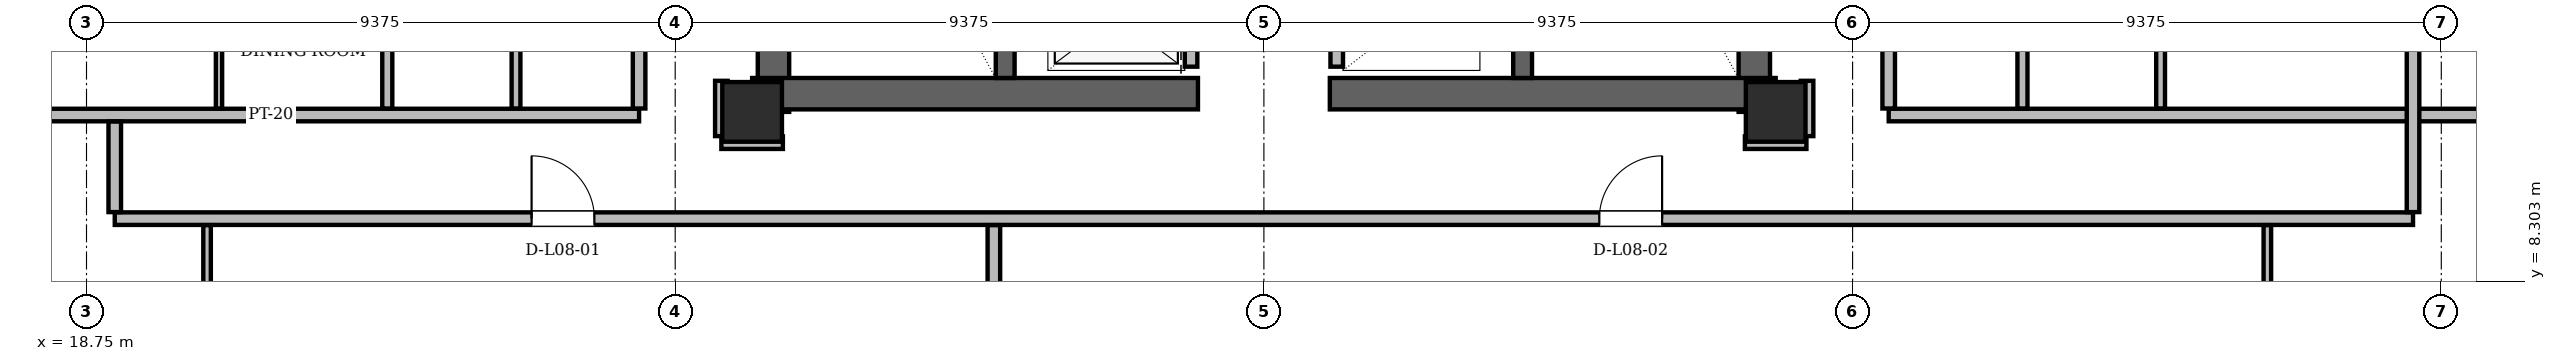
"""IFC4 building model, lengths in metres.
Left out: names, types, materials, properties, quantities, classifications, styles, units other than length and angle.
Written with IfcOpenShell. Run it as: python <this file> out.ifc"""

import sys

from ifc_helpers import new_model, si_unit, direction, frame, frame_2d, origin, origin_2d, place, context, subcontext, project, spatial, rectangle, hollow_rectangle, extrude, element, fill, save


model = new_model("IFC4")
c1 = context("Model", 3, precision=1e-05, world=origin(), true_north=direction((0.0, 1.0)))
c2 = subcontext(c1, "Body", "Model", "MODEL_VIEW")
j1 = project(units=[si_unit("LENGTHUNIT", "METRE"), si_unit("PLANEANGLEUNIT", "RADIAN")], contexts=[c1])
p1 = place(None, origin())
s1 = spatial("IfcSite", under=j1, at=p1, CompositionType="ELEMENT")
p2 = place(p1, origin())
s2 = spatial("IfcBuilding", under=s1, at=p2, CompositionType="ELEMENT")
p3 = place(p2, frame((0.0, 0.0, 34.5)))
s3 = spatial("IfcBuildingStorey", under=s2, at=p3, CompositionType="ELEMENT", Elevation=34.5)
for number, where, z_axis, x_axis in (
    (1, (29.35, 11.0, 0.0), (0.0, 0.0, 1.0), (1.0, 0.0, 0.0)),
    (2, (45.65, 11.0, 0.0), (0.0, 0.0, 1.0), (1.0, 0.0, 0.0)),
):
    element("IfcColumn", number, at=place(p3, frame(where, z_axis=z_axis, x_axis=x_axis)), inside=s3, PredefinedType="COLUMN", context=c2, shape_type="SweptSolid", body=[
        extrude(hollow_rectangle(XDim=0.95, YDim=0.95, WallThickness=0.08, at=origin_2d()), origin(), (0.0, 0.0, 1.0), 3.6),
    ])
for number, where, z_axis, x_axis in (
    (3, (29.69, 11.0, 0.0), (0.0, 0.0, 1.0), (0.0, 1.0, 0.0)),
    (4, (45.31, 11.0, 0.0), (0.0, 0.0, 1.0), (0.0, 1.0, 0.0)),
):
    element("IfcWall", number, at=place(p3, frame(where, z_axis=z_axis, x_axis=x_axis)), inside=s3, PredefinedType="SHEAR", context=c2, shape_type="SweptSolid", body=[
        extrude(rectangle(XDim=13.3, YDim=0.5, at=frame_2d((6.65, 0.0))), origin(), (0.0, 0.0, 1.0), 3.36),
    ])
for number, where, z_axis, x_axis in (
    (5, (29.35, 11.29, 0.0), (0.0, 0.0, 1.0), (1.0, 0.0, 0.0)),
    (6, (38.55, 11.29, 0.0), (0.0, 0.0, 1.0), (1.0, 0.0, 0.0)),
):
    element("IfcWall", number, at=place(p3, frame(where, z_axis=z_axis, x_axis=x_axis)), inside=s3, PredefinedType="SHEAR", context=c2, shape_type="SweptSolid", body=[
        extrude(rectangle(XDim=7.1, YDim=0.5, at=frame_2d((3.55, 0.0))), origin(), (0.0, 0.0, 1.0), 3.36),
    ])
for number, where, z_axis, x_axis in (
    (7, (33.38, 11.54, 0.0), (0.0, 0.0, 1.0), (0.0, 1.0, 0.0)),
    (8, (41.62, 11.54, 0.0), (0.0, 0.0, 1.0), (0.0, 1.0, 0.0)),
):
    element("IfcWall", number, at=place(p3, frame(where, z_axis=z_axis, x_axis=x_axis)), inside=s3, PredefinedType="SHEAR", context=c2, shape_type="SweptSolid", body=[
        extrude(rectangle(XDim=7.62, YDim=0.3, at=frame_2d((3.81, 0.0))), origin(), (0.0, 0.0, 1.0), 3.36),
    ])
p4 = place(p3, frame((13.222, 15.108, 0.0), z_axis=(0.0, 0.0, 1.0), x_axis=(0.499997339613, -0.866026939754, 0.0)))
e9 = element("IfcWall", 9, at=p4, inside=s3, PredefinedType="SOLIDWALL", context=c2, shape_type="SweptSolid", body=[
    extrude(rectangle(XDim=15.632, YDim=0.34, at=frame_2d((7.816, 0.0))), origin(), (0.0, 0.0, 1.0), 2.494),
])
p5 = place(p4, frame((1.411, 0.0, 1.28)))
e10 = element("IfcOpeningElement", 10, at=p5, cuts=e9, PredefinedType="OPENING", context=c2, shape_type="SweptSolid", body=[
    extrude(rectangle(XDim=0.85, YDim=0.92, at=frame_2d((0.425, 0.46))), frame((0.0, 0.17, 0.0), z_axis=(0.0, -1.0, 0.0), x_axis=(1.0, 0.0, 0.0)), (0.0, 0.0, 1.0), 0.34),
])
p6 = place(p3, frame((53.962, 1.57, 0.0), z_axis=(0.0, 0.0, 1.0), x_axis=(0.499997339613, 0.866026939754, 0.0)))
e11 = element("IfcWall", 11, at=p6, inside=s3, PredefinedType="SOLIDWALL", context=c2, shape_type="SweptSolid", body=[
    extrude(rectangle(XDim=15.632, YDim=0.34, at=frame_2d((7.816, 0.0))), origin(), (0.0, 0.0, 1.0), 2.494),
])
p7 = place(p6, frame((13.371, 0.0, 1.28)))
e12 = element("IfcOpeningElement", 12, at=p7, cuts=e11, PredefinedType="OPENING", context=c2, shape_type="SweptSolid", body=[
    extrude(rectangle(XDim=0.85, YDim=0.92, at=frame_2d((0.425, 0.46))), frame((0.0, 0.17, 0.0), z_axis=(0.0, -1.0, 0.0), x_axis=(1.0, 0.0, 0.0)), (0.0, 0.0, 1.0), 0.34),
])
p8 = place(p3, frame((36.34, 11.72, 0.0), z_axis=(0.0, 0.0, 1.0), x_axis=(0.0, 1.0, 0.0)))
e13 = element("IfcWall", 13, at=p8, inside=s3, PredefinedType="PARTITIONING", context=c2, shape_type="SweptSolid", body=[
    extrude(rectangle(XDim=7.6, YDim=0.2, at=frame_2d((3.8, 0.0))), origin(), (0.0, 0.0, 1.0), 3.36),
])
p9 = place(p8, frame((0.255, 0.0, 0.0)))
e14 = element("IfcOpeningElement", 14, at=p9, cuts=e13, PredefinedType="OPENING", context=c2, shape_type="SweptSolid", body=[
    extrude(rectangle(XDim=1.05, YDim=2.15, at=frame_2d((0.525, 1.075))), frame((0.0, 0.1, 0.0), z_axis=(0.0, -1.0, 0.0), x_axis=(1.0, 0.0, 0.0)), (0.0, 0.0, 1.0), 0.2),
])
p10 = place(p8, frame((2.105, 0.0, 0.0)))
e15 = element("IfcOpeningElement", 15, at=p10, cuts=e13, PredefinedType="OPENING", context=c2, shape_type="SweptSolid", body=[
    extrude(rectangle(XDim=1.05, YDim=2.15, at=frame_2d((0.525, 1.075))), frame((0.0, 0.1, 0.0), z_axis=(0.0, -1.0, 0.0), x_axis=(1.0, 0.0, 0.0)), (0.0, 0.0, 1.0), 0.2),
])
p11 = place(p8, frame((3.955, 0.0, 0.0)))
e16 = element("IfcOpeningElement", 16, at=p11, cuts=e13, PredefinedType="OPENING", context=c2, shape_type="SweptSolid", body=[
    extrude(rectangle(XDim=1.05, YDim=2.15, at=frame_2d((0.525, 1.075))), frame((0.0, 0.1, 0.0), z_axis=(0.0, -1.0, 0.0), x_axis=(1.0, 0.0, 0.0)), (0.0, 0.0, 1.0), 0.2),
])
p12 = place(p3, frame((38.66, 11.72, 0.0), z_axis=(0.0, 0.0, 1.0), x_axis=(0.0, 1.0, 0.0)))
e17 = element("IfcWall", 17, at=p12, inside=s3, PredefinedType="PARTITIONING", context=c2, shape_type="SweptSolid", body=[
    extrude(rectangle(XDim=9.1, YDim=0.2, at=frame_2d((4.55, 0.0))), origin(), (0.0, 0.0, 1.0), 3.36),
])
p13 = place(p3, frame((19.2, 9.3, 0.0), z_axis=(0.0, 0.0, 1.0), x_axis=(1.0, 0.0, 0.0)))
e18 = element("IfcWall", 18, at=p13, inside=s3, PredefinedType="PARTITIONING", context=c2, shape_type="SweptSolid", body=[
    extrude(rectangle(XDim=36.6, YDim=0.2, at=frame_2d((18.3, 0.0))), origin(), (0.0, 0.0, 1.0), 2.738),
])
p14 = place(p13, frame((6.638, 0.0, 0.0)))
e19 = element("IfcOpeningElement", 19, at=p14, cuts=e18, PredefinedType="OPENING", context=c2, shape_type="SweptSolid", body=[
    extrude(rectangle(XDim=1.0, YDim=2.18, at=frame_2d((0.5, 1.09))), frame((0.0, 0.1, 0.0), z_axis=(0.0, -1.0, 0.0), x_axis=(1.0, 0.0, 0.0)), (0.0, 0.0, 1.0), 0.2),
])
p15 = place(p13, frame((23.642, 0.0, 0.0)))
e20 = element("IfcOpeningElement", 20, at=p15, cuts=e18, PredefinedType="OPENING", context=c2, shape_type="SweptSolid", body=[
    extrude(rectangle(XDim=1.0, YDim=2.18, at=frame_2d((0.5, 1.09))), frame((0.0, 0.1, 0.0), z_axis=(0.0, -1.0, 0.0), x_axis=(1.0, 0.0, 0.0)), (0.0, 0.0, 1.0), 0.2),
])
for number, where, z_axis, x_axis in (
    (21, (28.86, 10.51, 0.0), (0.0, 0.0, 1.0), (1.0, 0.0, 0.0)),
    (22, (45.16, 10.51, 0.0), (0.0, 0.0, 1.0), (1.0, 0.0, 0.0)),
):
    element("IfcWall", number, at=place(p3, frame(where, z_axis=z_axis, x_axis=x_axis)), inside=s3, PredefinedType="PARTITIONING", context=c2, shape_type="SweptSolid", body=[
        extrude(rectangle(XDim=0.98, YDim=0.2, at=frame_2d((0.49, 0.0))), origin(), (0.0, 0.0, 1.0), 2.738),
    ])
for number, where, z_axis, x_axis in (
    (23, (15.824, 10.95, 0.0), (0.0, 0.0, 1.0), (1.0, 0.0, 0.0)),
    (24, (47.45, 10.95, 0.0), (0.0, 0.0, 1.0), (1.0, 0.0, 0.0)),
):
    element("IfcWall", number, at=place(p3, frame(where, z_axis=z_axis, x_axis=x_axis)), inside=s3, PredefinedType="PARTITIONING", context=c2, shape_type="SweptSolid", body=[
        extrude(rectangle(XDim=11.726, YDim=0.2, at=frame_2d((5.863, 0.0))), origin(), (0.0, 0.0, 1.0), 3.36),
    ])
p16 = place(p3, frame((19.2, 9.404, 0.0), z_axis=(0.0, 0.0, 1.0), x_axis=(0.0, 1.0, 0.0)))
e25 = element("IfcWall", 25, at=p16, inside=s3, PredefinedType="PARTITIONING", context=c2, shape_type="SweptSolid", body=[
    extrude(rectangle(XDim=1.442, YDim=0.2, at=frame_2d((0.721, 0.0))), origin(), (0.0, 0.0, 1.0), 3.36),
])
p17 = place(p3, frame((20.67, 2.556, 0.0), z_axis=(0.0, 0.0, 1.0), x_axis=(0.0, 1.0, 0.0)))
e26 = element("IfcWall", 26, at=p17, inside=s3, PredefinedType="PARTITIONING", context=c2, shape_type="SweptSolid", body=[
    extrude(rectangle(XDim=6.64, YDim=0.12, at=frame_2d((3.32, 0.0))), origin(), (0.0, 0.0, 1.0), 3.36),
])
p18 = place(p17, frame((2.906, 0.0, 0.0)))
e27 = element("IfcOpeningElement", 27, at=p18, cuts=e26, PredefinedType="OPENING", context=c2, shape_type="SweptSolid", body=[
    extrude(rectangle(XDim=0.88, YDim=2.08, at=frame_2d((0.44, 1.04))), frame((0.0, 0.06, 0.0), z_axis=(0.0, -1.0, 0.0), x_axis=(1.0, 0.0, 0.0)), (0.0, 0.0, 1.0), 0.12),
])
p19 = place(p3, frame((20.86, 11.054, 0.0), z_axis=(0.0, 0.0, 1.0), x_axis=(0.0, 1.0, 0.0)))
e28 = element("IfcWall", 28, at=p19, inside=s3, PredefinedType="PARTITIONING", context=c2, shape_type="SweptSolid", body=[
    extrude(rectangle(XDim=3.572, YDim=0.1, at=frame_2d((1.786, 0.0))), origin(), (0.0, 0.0, 1.0), 2.738),
])
p20 = place(p3, frame((23.54, 11.054, 0.0), z_axis=(0.0, 0.0, 1.0), x_axis=(0.0, 1.0, 0.0)))
e29 = element("IfcWall", 29, at=p20, inside=s3, PredefinedType="PARTITIONING", context=c2, shape_type="SweptSolid", body=[
    extrude(rectangle(XDim=3.572, YDim=0.16, at=frame_2d((1.786, 0.0))), origin(), (0.0, 0.0, 1.0), 2.738),
])
p21 = place(p3, frame((25.59, 11.054, 0.0), z_axis=(0.0, 0.0, 1.0), x_axis=(0.0, 1.0, 0.0)))
e30 = element("IfcWall", 30, at=p21, inside=s3, PredefinedType="PARTITIONING", context=c2, shape_type="SweptSolid", body=[
    extrude(rectangle(XDim=3.572, YDim=0.14, at=frame_2d((1.786, 0.0))), origin(), (0.0, 0.0, 1.0), 2.738),
])
p22 = place(p3, frame((27.55, 11.054, 0.0), z_axis=(0.0, 0.0, 1.0), x_axis=(0.0, 1.0, 0.0)))
e31 = element("IfcWall", 31, at=p22, inside=s3, PredefinedType="PARTITIONING", context=c2, shape_type="SweptSolid", body=[
    extrude(rectangle(XDim=14.812, YDim=0.2, at=frame_2d((7.406, 0.0))), origin(), (0.0, 0.0, 1.0), 2.738),
])
p23 = place(p22, frame((7.932, 0.0, 0.0)))
e32 = element("IfcOpeningElement", 32, at=p23, cuts=e31, PredefinedType="OPENING", context=c2, shape_type="SweptSolid", body=[
    extrude(rectangle(XDim=1.0, YDim=2.18, at=frame_2d((0.5, 1.09))), frame((0.0, 0.1, 0.0), z_axis=(0.0, -1.0, 0.0), x_axis=(1.0, 0.0, 0.0)), (0.0, 0.0, 1.0), 0.2),
])
p24 = place(p3, frame((28.86, 10.614, 0.0), z_axis=(0.0, 0.0, 1.0), x_axis=(0.0, 1.0, 0.0)))
e33 = element("IfcWall", 33, at=p24, inside=s3, PredefinedType="PARTITIONING", context=c2, shape_type="SweptSolid", body=[
    extrude(rectangle(XDim=0.881, YDim=0.2, at=frame_2d((0.44, 0.0))), origin(), (0.0, 0.0, 1.0), 2.738),
])
p25 = place(p3, frame((33.2, 1.744, 0.0), z_axis=(0.0, 0.0, 1.0), x_axis=(0.0, 1.0, 0.0)))
e34 = element("IfcWall", 34, at=p25, inside=s3, PredefinedType="PARTITIONING", context=c2, shape_type="SweptSolid", body=[
    extrude(rectangle(XDim=7.452, YDim=0.2, at=frame_2d((3.726, 0.0))), origin(), (0.0, 0.0, 1.0), 2.946),
])
p26 = place(p3, frame((46.15, 10.614, 0.0), z_axis=(0.0, 0.0, 1.0), x_axis=(0.0, 1.0, 0.0)))
e35 = element("IfcWall", 35, at=p26, inside=s3, PredefinedType="PARTITIONING", context=c2, shape_type="SweptSolid", body=[
    extrude(rectangle(XDim=0.881, YDim=0.2, at=frame_2d((0.44, 0.0))), origin(), (0.0, 0.0, 1.0), 2.738),
])
p27 = place(p3, frame((47.45, 11.054, 0.0), z_axis=(0.0, 0.0, 1.0), x_axis=(0.0, 1.0, 0.0)))
e36 = element("IfcWall", 36, at=p27, inside=s3, PredefinedType="PARTITIONING", context=c2, shape_type="SweptSolid", body=[
    extrude(rectangle(XDim=14.812, YDim=0.2, at=frame_2d((7.406, 0.0))), origin(), (0.0, 0.0, 1.0), 2.738),
])
p28 = place(p27, frame((7.932, 0.0, 0.0)))
e37 = element("IfcOpeningElement", 37, at=p28, cuts=e36, PredefinedType="OPENING", context=c2, shape_type="SweptSolid", body=[
    extrude(rectangle(XDim=1.0, YDim=2.18, at=frame_2d((0.5, 1.09))), frame((0.0, 0.1, 0.0), z_axis=(0.0, -1.0, 0.0), x_axis=(1.0, 0.0, 0.0)), (0.0, 0.0, 1.0), 0.2),
])
p29 = place(p3, frame((49.58, 11.054, 0.0), z_axis=(0.0, 0.0, 1.0), x_axis=(0.0, 1.0, 0.0)))
e38 = element("IfcWall", 38, at=p29, inside=s3, PredefinedType="PARTITIONING", context=c2, shape_type="SweptSolid", body=[
    extrude(rectangle(XDim=3.582, YDim=0.16, at=frame_2d((1.791, 0.0))), origin(), (0.0, 0.0, 1.0), 2.738),
])
p30 = place(p3, frame((51.78, 11.054, 0.0), z_axis=(0.0, 0.0, 1.0), x_axis=(0.0, 1.0, 0.0)))
e39 = element("IfcWall", 39, at=p30, inside=s3, PredefinedType="PARTITIONING", context=c2, shape_type="SweptSolid", body=[
    extrude(rectangle(XDim=3.582, YDim=0.14, at=frame_2d((1.791, 0.0))), origin(), (0.0, 0.0, 1.0), 2.738),
])
p31 = place(p3, frame((53.48, 1.744, 0.0), z_axis=(0.0, 0.0, 1.0), x_axis=(0.0, 1.0, 0.0)))
e40 = element("IfcWall", 40, at=p31, inside=s3, PredefinedType="PARTITIONING", context=c2, shape_type="SweptSolid", body=[
    extrude(rectangle(XDim=7.452, YDim=0.12, at=frame_2d((3.726, 0.0))), origin(), (0.0, 0.0, 1.0), 2.738),
])
p32 = place(p31, frame((3.326, 0.0, 0.0)))
e41 = element("IfcOpeningElement", 41, at=p32, cuts=e40, PredefinedType="OPENING", context=c2, shape_type="SweptSolid", body=[
    extrude(rectangle(XDim=0.88, YDim=2.08, at=frame_2d((0.44, 1.04))), frame((0.0, 0.06, 0.0), z_axis=(0.0, -1.0, 0.0), x_axis=(1.0, 0.0, 0.0)), (0.0, 0.0, 1.0), 0.12),
])
p33 = place(p3, frame((55.8, 9.404, 0.0), z_axis=(0.0, 0.0, 1.0), x_axis=(0.0, 1.0, 0.0)))
e42 = element("IfcWall", 42, at=p33, inside=s3, PredefinedType="PARTITIONING", context=c2, shape_type="SweptSolid", body=[
    extrude(rectangle(XDim=5.232, YDim=0.2, at=frame_2d((2.616, 0.0))), origin(), (0.0, 0.0, 1.0), 2.738),
])
p34 = place(p14, origin())
e43 = element("IfcDoor", 43, at=p34, inside=s3, OperationType="SINGLE_SWING_LEFT", PredefinedType="DOOR", context=c2, shape_type="SweptSolid", body=[
    extrude(rectangle(XDim=1.0, YDim=2.18, at=frame_2d((0.5, 1.09))), frame((0.0, 0.025, 0.0), z_axis=(0.0, -1.0, 0.0), x_axis=(1.0, 0.0, 0.0)), (0.0, 0.0, 1.0), 0.05),
])
fill(e19, e43)
p35 = place(p15, origin())
e44 = element("IfcDoor", 44, at=p35, inside=s3, OperationType="SINGLE_SWING_RIGHT", PredefinedType="DOOR", context=c2, shape_type="SweptSolid", body=[
    extrude(rectangle(XDim=1.0, YDim=2.18, at=frame_2d((0.5, 1.09))), frame((0.0, 0.025, 0.0), z_axis=(0.0, -1.0, 0.0), x_axis=(1.0, 0.0, 0.0)), (0.0, 0.0, 1.0), 0.05),
])
fill(e20, e44)
save(model, sys.argv[1])
